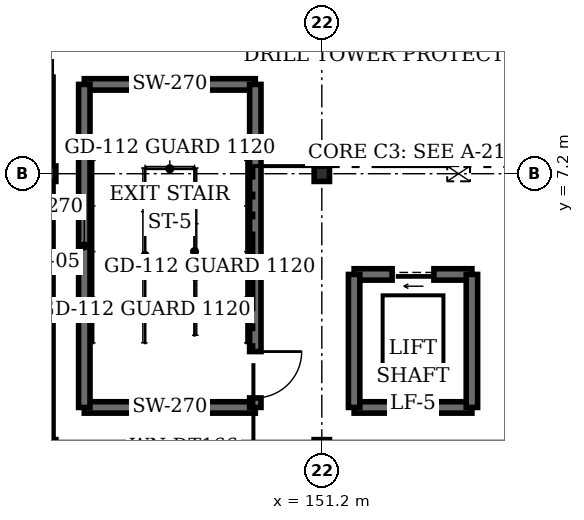
"""IFC4 building model, lengths in metres.
Left out: names, types, materials, properties, quantities, classifications, styles, units other than length and angle.
Written with IfcOpenShell. Run it as: python <this file> out.ifc"""

import sys

from ifc_helpers import new_model, si_unit, direction, frame, frame_2d, origin, origin_2d, place, context, subcontext, project, spatial, rectangle, i_section, extrude, element, fill, save


model = new_model("IFC4")
c1 = context("Model", 3, precision=1e-05, world=origin(), true_north=direction((0.0, 1.0)))
c2 = subcontext(c1, "Body", "Model", "MODEL_VIEW")
j1 = project(units=[si_unit("LENGTHUNIT", "METRE"), si_unit("PLANEANGLEUNIT", "RADIAN")], contexts=[c1])
p1 = place(None, origin())
s1 = spatial("IfcSite", under=j1, at=p1, CompositionType="ELEMENT")
p2 = place(p1, origin())
s2 = spatial("IfcBuilding", under=s1, at=p2, CompositionType="ELEMENT")
p3 = place(p2, origin())
s3 = spatial("IfcBuildingStorey", under=s2, at=p3, CompositionType="ELEMENT", Elevation=0.0)
for number, where, z_axis, x_axis in (
    (1, (144.0, 0.0, 0.0), (0.0, 0.0, 1.0), (1.0, 0.0, 0.0)),
    (2, (144.0, 7.2, 0.0), (0.0, 0.0, 1.0), (1.0, 0.0, 0.0)),
    (3, (151.2, 0.0, 0.0), (0.0, 0.0, 1.0), (1.0, 0.0, 0.0)),
    (4, (151.2, 7.2, 0.0), (0.0, 0.0, 1.0), (1.0, 0.0, 0.0)),
):
    element("IfcColumn", number, at=place(p3, frame(where, z_axis=z_axis, x_axis=x_axis)), inside=s3, PredefinedType="COLUMN", context=c2, shape_type="SweptSolid", body=[
        extrude(i_section(OverallWidth=0.404, OverallDepth=0.407, WebThickness=0.027, FlangeThickness=0.044, at=origin_2d()), origin(), (0.0, 0.0, 1.0), 6.0),
    ])
p4 = place(p3, frame((144.0, 14.4, 0.0), z_axis=(0.0, 0.0, 1.0), x_axis=(0.0, -1.0, 0.0)))
e5 = element("IfcWall", 5, at=p4, inside=s3, PredefinedType="STANDARD", context=c2, shape_type="SweptSolid", body=[
    extrude(rectangle(XDim=14.4, YDim=0.255, at=frame_2d((7.2, 0.0))), origin(), (0.0, 0.0, 1.0), 5.022),
])
p5 = place(p4, frame((3.0, 0.0, 1.15)))
e6 = element("IfcOpeningElement", 6, at=p5, cuts=e5, PredefinedType="OPENING", context=c2, shape_type="SweptSolid", body=[
    extrude(rectangle(XDim=1.66, YDim=1.54, at=frame_2d((0.83, 0.77))), frame((0.0, 0.137, 0.0), z_axis=(0.0, -1.0, 0.0), x_axis=(1.0, 0.0, 0.0)), (0.0, 0.0, 1.0), 0.275),
])
for number, where, z_axis, x_axis in (
    (7, (144.95, 1.05, 0.0), (0.0, 0.0, 1.0), (1.0, 0.0, 0.0)),
    (8, (149.45, 9.55, 0.0), (0.0, 0.0, 1.0), (-1.0, 0.0, 0.0)),
):
    element("IfcWall", number, at=place(p3, frame(where, z_axis=z_axis, x_axis=x_axis)), inside=s3, PredefinedType="SHEAR", context=c2, shape_type="SweptSolid", body=[
        extrude(rectangle(XDim=4.5, YDim=0.3, at=frame_2d((2.25, 0.0))), origin(), (0.0, 0.0, 1.0), 5.715),
    ])
p6 = place(p3, frame((144.95, 1.05, 0.0), z_axis=(0.0, 0.0, 1.0), x_axis=(0.0, 1.0, 0.0)))
e9 = element("IfcWall", 9, at=p6, inside=s3, PredefinedType="SHEAR", context=c2, shape_type="SweptSolid", body=[
    extrude(rectangle(XDim=8.5, YDim=0.3, at=frame_2d((4.25, 0.0))), origin(), (0.0, 0.0, 1.0), 5.715),
])
p7 = place(p3, frame((149.45, 9.55, 0.0), z_axis=(0.0, 0.0, 1.0), x_axis=(0.0, -1.0, 0.0)))
e10 = element("IfcWall", 10, at=p7, inside=s3, PredefinedType="SHEAR", context=c2, shape_type="SweptSolid", body=[
    extrude(rectangle(XDim=8.5, YDim=0.3, at=frame_2d((4.25, 0.0))), origin(), (0.0, 0.0, 1.0), 5.715),
])
p8 = place(p7, frame((7.03, 0.0, 0.0)))
e11 = element("IfcOpeningElement", 11, at=p8, cuts=e10, PredefinedType="OPENING", context=c2, shape_type="SweptSolid", body=[
    extrude(rectangle(XDim=1.22, YDim=2.16, at=frame_2d((0.61, 1.08))), frame((0.0, 0.16, 0.0), z_axis=(0.0, -1.0, 0.0), x_axis=(1.0, 0.0, 0.0)), (0.0, 0.0, 1.0), 0.32),
])
p9 = place(p3, frame((152.05, 1.05, 0.0), z_axis=(0.0, 0.0, 1.0), x_axis=(1.0, 0.0, 0.0)))
e12 = element("IfcWall", 12, at=p9, inside=s3, PredefinedType="SHEAR", context=c2, shape_type="SweptSolid", body=[
    extrude(rectangle(XDim=3.1, YDim=0.3, at=frame_2d((1.55, 0.0))), origin(), (0.0, 0.0, 1.0), 5.715),
])
p10 = place(p3, frame((155.15, 4.55, 0.0), z_axis=(0.0, 0.0, 1.0), x_axis=(-1.0, 0.0, 0.0)))
e13 = element("IfcWall", 13, at=p10, inside=s3, PredefinedType="SHEAR", context=c2, shape_type="SweptSolid", body=[
    extrude(rectangle(XDim=3.1, YDim=0.3, at=frame_2d((1.55, 0.0))), origin(), (0.0, 0.0, 1.0), 5.715),
])
p11 = place(p10, frame((1.0, 0.0, 0.0)))
e14 = element("IfcOpeningElement", 14, at=p11, cuts=e13, PredefinedType="OPENING", context=c2, shape_type="SweptSolid", body=[
    extrude(rectangle(XDim=1.1, YDim=2.22, at=frame_2d((0.55, 1.11))), frame((0.0, 0.16, 0.0), z_axis=(0.0, -1.0, 0.0), x_axis=(1.0, 0.0, 0.0)), (0.0, 0.0, 1.0), 0.32),
])
for number, where, z_axis, x_axis in (
    (15, (152.05, 4.55, 0.0), (0.0, 0.0, 1.0), (0.0, -1.0, 0.0)),
    (16, (155.15, 1.05, 0.0), (0.0, 0.0, 1.0), (0.0, 1.0, 0.0)),
):
    element("IfcWall", number, at=place(p3, frame(where, z_axis=z_axis, x_axis=x_axis)), inside=s3, PredefinedType="SHEAR", context=c2, shape_type="SweptSolid", body=[
        extrude(rectangle(XDim=3.5, YDim=0.3, at=frame_2d((1.75, 0.0))), origin(), (0.0, 0.0, 1.0), 5.715),
    ])
p12 = place(p8, origin())
e17 = element("IfcDoor", 17, at=p12, inside=s3, OperationType="SINGLE_SWING_LEFT", PredefinedType="DOOR", context=c2, shape_type="SweptSolid", body=[
    extrude(rectangle(XDim=1.22, YDim=2.16, at=frame_2d((0.61, 1.08))), frame((0.0, 0.025, 0.0), z_axis=(0.0, -1.0, 0.0), x_axis=(1.0, 0.0, 0.0)), (0.0, 0.0, 1.0), 0.05),
])
fill(e11, e17)
p13 = place(p11, origin())
e18 = element("IfcDoor", 18, at=p13, inside=s3, OperationType="SLIDING_TO_LEFT", PredefinedType="DOOR", context=c2, shape_type="SweptSolid", body=[
    extrude(rectangle(XDim=1.1, YDim=2.22, at=frame_2d((0.55, 1.11))), frame((0.0, 0.025, 0.0), z_axis=(0.0, -1.0, 0.0), x_axis=(1.0, 0.0, 0.0)), (0.0, 0.0, 1.0), 0.05),
])
fill(e14, e18)
save(model, sys.argv[1])
